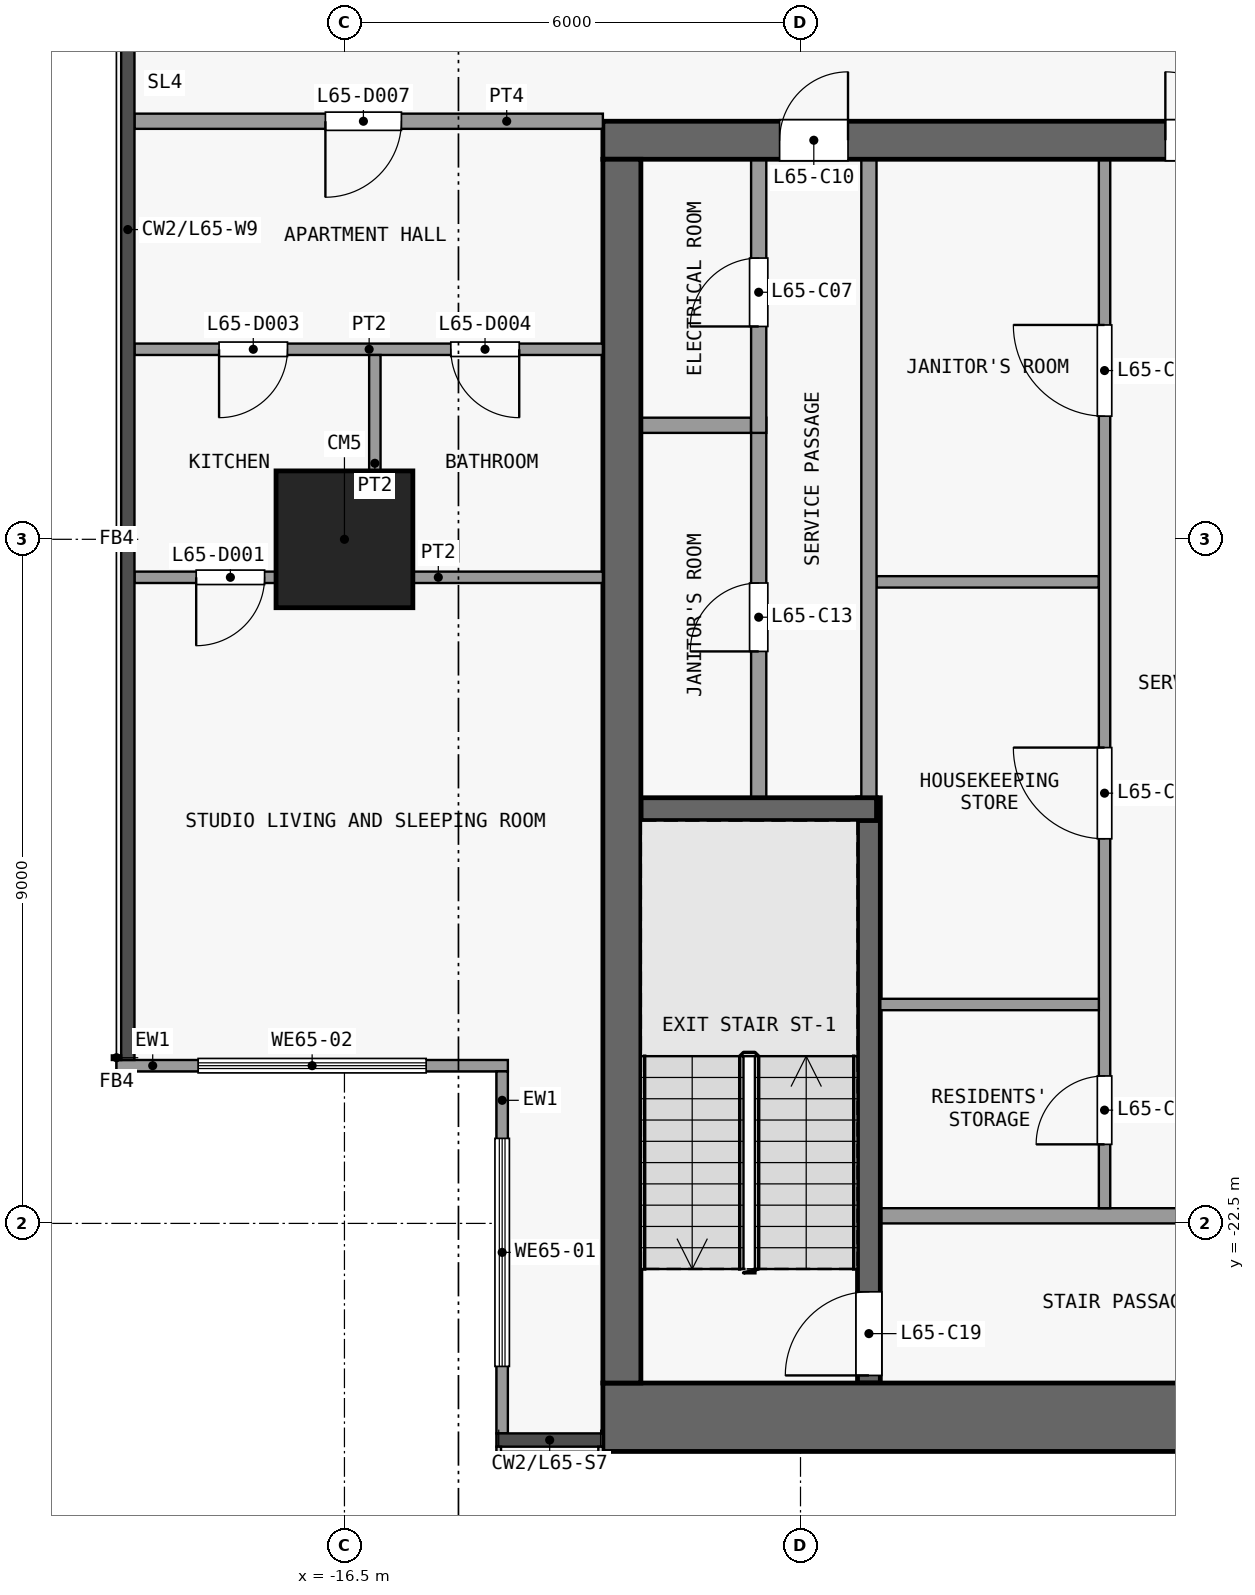
"""IFC4 building model, lengths in metres.
Left out: names, types, materials, properties, quantities, classifications, styles, units other than length and angle.
Written with IfcOpenShell. Run it as: python <this file> out.ifc"""

import sys

from ifc_helpers import new_model, si_unit, direction, frame, frame_2d, origin, origin_2d, place, context, subcontext, project, spatial, rectangle, extrude, element, fill, save


model = new_model("IFC4")
c1 = context("Model", 3, precision=1e-05, world=origin(), true_north=direction((0.0, 1.0)))
c2 = subcontext(c1, "Body", "Model", "MODEL_VIEW")
j1 = project(units=[si_unit("LENGTHUNIT", "METRE"), si_unit("PLANEANGLEUNIT", "RADIAN")], contexts=[c1])
p1 = place(None, origin())
s1 = spatial("IfcSite", under=j1, at=p1, CompositionType="ELEMENT")
p2 = place(p1, origin())
s2 = spatial("IfcBuilding", under=s1, at=p2, CompositionType="ELEMENT")
p3 = place(p2, frame((0.0, 0.0, 259.1)))
s3 = spatial("IfcBuildingStorey", under=s2, at=p3, CompositionType="ELEMENT", Elevation=259.1)
p4 = place(p3, frame((-16.5, -13.5, 0.0), z_axis=(0.0, 0.0, 1.0), x_axis=(1.0, 0.0, 0.0)))
e1 = element("IfcColumn", 1, at=p4, inside=s3, PredefinedType="COLUMN", context=c2, shape_type="SweptSolid", body=[
    extrude(rectangle(XDim=1.8, YDim=1.8, at=origin_2d()), origin(), (0.0, 0.0, 1.0), 3.6),
])
p5 = place(p3, frame((-13.1, -25.05, 0.0), z_axis=(0.0, 0.0, 1.0), x_axis=(1.0, 0.0, 0.0)))
e2 = element("IfcWall", 2, at=p5, inside=s3, PredefinedType="SHEAR", context=c2, shape_type="SweptSolid", body=[
    extrude(rectangle(XDim=26.2, YDim=0.9, at=frame_2d((13.1, 0.0))), origin(), (0.0, 0.0, 1.0), 3.3),
])
p6 = place(p3, frame((-13.1, -8.25, 0.0), z_axis=(0.0, 0.0, 1.0), x_axis=(1.0, 0.0, 0.0)))
e3 = element("IfcWall", 3, at=p6, inside=s3, PredefinedType="SHEAR", context=c2, shape_type="SweptSolid", body=[
    extrude(rectangle(XDim=26.2, YDim=0.5, at=frame_2d((13.1, 0.0))), origin(), (0.0, 0.0, 1.0), 3.3),
])
p7 = place(p6, frame((7.4, 0.0, 0.0)))
e4 = element("IfcOpeningElement", 4, at=p7, cuts=e3, PredefinedType="OPENING", context=c2, shape_type="SweptSolid", body=[
    extrude(rectangle(XDim=1.8, YDim=2.1, at=frame_2d((0.9, 1.05))), frame((0.0, 0.26, 0.0), z_axis=(0.0, -1.0, 0.0), x_axis=(1.0, 0.0, 0.0)), (0.0, 0.0, 1.0), 0.52),
])
p8 = place(p6, frame((17.0, 0.0, 0.0)))
e5 = element("IfcOpeningElement", 5, at=p8, cuts=e3, PredefinedType="OPENING", context=c2, shape_type="SweptSolid", body=[
    extrude(rectangle(XDim=1.8, YDim=2.1, at=frame_2d((0.9, 1.05))), frame((0.0, 0.26, 0.0), z_axis=(0.0, -1.0, 0.0), x_axis=(1.0, 0.0, 0.0)), (0.0, 0.0, 1.0), 0.52),
])
p9 = place(p6, frame((2.325, 0.0, 0.0)))
e6 = element("IfcOpeningElement", 6, at=p9, cuts=e3, PredefinedType="OPENING", context=c2, shape_type="SweptSolid", body=[
    extrude(rectangle(XDim=0.9, YDim=2.1, at=frame_2d((0.45, 1.05))), frame((0.0, 0.26, 0.0), z_axis=(0.0, -1.0, 0.0), x_axis=(1.0, 0.0, 0.0)), (0.0, 0.0, 1.0), 0.52),
])
p10 = place(p6, frame((23.675, 0.0, 0.0)))
e7 = element("IfcOpeningElement", 7, at=p10, cuts=e3, PredefinedType="OPENING", context=c2, shape_type="SweptSolid", body=[
    extrude(rectangle(XDim=1.2, YDim=2.1, at=frame_2d((0.6, 1.05))), frame((0.0, 0.26, 0.0), z_axis=(0.0, -1.0, 0.0), x_axis=(1.0, 0.0, 0.0)), (0.0, 0.0, 1.0), 0.52),
])
p11 = place(p3, frame((-12.85, -24.6, 0.0), z_axis=(0.0, 0.0, 1.0), x_axis=(0.0, 1.0, 0.0)))
e8 = element("IfcWall", 8, at=p11, inside=s3, PredefinedType="SHEAR", context=c2, shape_type="SweptSolid", body=[
    extrude(rectangle(XDim=16.1, YDim=0.5, at=frame_2d((8.05, 0.0))), origin(), (0.0, 0.0, 1.0), 3.3),
])
p12 = place(p3, frame((-3.25, -22.4, 0.0), z_axis=(0.0, 0.0, 1.0), x_axis=(-1.0, 0.0, 0.0)))
e9 = element("IfcWall", 9, at=p12, inside=s3, PredefinedType="PARTITIONING", context=c2, shape_type="SweptSolid", body=[
    extrude(rectangle(XDim=6.2, YDim=0.2, at=frame_2d((3.1, 0.0))), origin(), (0.0, 0.0, 1.0), 3.3),
])
p13 = place(p12, frame((0.8, 0.0, 0.0)))
e10 = element("IfcOpeningElement", 10, at=p13, cuts=e9, PredefinedType="OPENING", context=c2, shape_type="SweptSolid", body=[
    extrude(rectangle(XDim=1.5, YDim=2.1, at=frame_2d((0.75, 1.05))), frame((0.0, 0.11, 0.0), z_axis=(0.0, -1.0, 0.0), x_axis=(1.0, 0.0, 0.0)), (0.0, 0.0, 1.0), 0.22),
])
p14 = place(p3, frame((-9.45, -19.62, 0.0), z_axis=(0.0, 0.0, 1.0), x_axis=(1.0, 0.0, 0.0)))
e11 = element("IfcWall", 11, at=p14, inside=s3, PredefinedType="PARTITIONING", context=c2, shape_type="SweptSolid", body=[
    extrude(rectangle(XDim=2.875, YDim=0.15, at=frame_2d((1.438, 0.0))), origin(), (0.0, 0.0, 1.0), 3.3),
])
p15 = place(p3, frame((-12.6, -17.05, 0.0), z_axis=(0.0, 0.0, 1.0), x_axis=(1.0, 0.0, 0.0)))
e12 = element("IfcWall", 12, at=p15, inside=s3, PredefinedType="SHEAR", context=c2, shape_type="SweptSolid", body=[
    extrude(rectangle(XDim=3.1, YDim=0.3, at=frame_2d((1.55, 0.0))), origin(), (0.0, 0.0, 1.0), 3.3),
])
p16 = place(p3, frame((-9.5, -14.06, 0.0), z_axis=(0.0, 0.0, 1.0), x_axis=(1.0, 0.0, 0.0)))
e13 = element("IfcWall", 13, at=p16, inside=s3, PredefinedType="PARTITIONING", context=c2, shape_type="SweptSolid", body=[
    extrude(rectangle(XDim=2.925, YDim=0.15, at=frame_2d((1.462, 0.0))), origin(), (0.0, 0.0, 1.0), 3.3),
])
p17 = place(p3, frame((-12.6, -12.0, 0.0), z_axis=(0.0, 0.0, 1.0), x_axis=(1.0, 0.0, 0.0)))
e14 = element("IfcWall", 14, at=p17, inside=s3, PredefinedType="PARTITIONING", context=c2, shape_type="SweptSolid", body=[
    extrude(rectangle(XDim=1.45, YDim=0.2, at=frame_2d((0.725, 0.0))), origin(), (0.0, 0.0, 1.0), 3.3),
])
p18 = place(p3, frame((-11.05, -16.9, 0.0), z_axis=(0.0, 0.0, 1.0), x_axis=(0.0, 1.0, 0.0)))
e15 = element("IfcWall", 15, at=p18, inside=s3, PredefinedType="PARTITIONING", context=c2, shape_type="SweptSolid", body=[
    extrude(rectangle(XDim=5.0, YDim=0.2, at=frame_2d((2.5, 0.0))), origin(), (0.0, 0.0, 1.0), 3.3),
])
p19 = place(p18, frame((1.925, 0.0, 0.0)))
e16 = element("IfcOpeningElement", 16, at=p19, cuts=e15, PredefinedType="OPENING", context=c2, shape_type="SweptSolid", body=[
    extrude(rectangle(XDim=0.9, YDim=2.1, at=frame_2d((0.45, 1.05))), frame((0.0, 0.11, 0.0), z_axis=(0.0, -1.0, 0.0), x_axis=(1.0, 0.0, 0.0)), (0.0, 0.0, 1.0), 0.22),
])
p20 = place(p3, frame((-11.05, -12.1, 0.0), z_axis=(0.0, 0.0, 1.0), x_axis=(0.0, 1.0, 0.0)))
e17 = element("IfcWall", 17, at=p20, inside=s3, PredefinedType="PARTITIONING", context=c2, shape_type="SweptSolid", body=[
    extrude(rectangle(XDim=3.6, YDim=0.2, at=frame_2d((1.8, 0.0))), origin(), (0.0, 0.0, 1.0), 3.3),
])
p21 = place(p20, frame((1.4, 0.0, 0.0)))
e18 = element("IfcOpeningElement", 18, at=p21, cuts=e17, PredefinedType="OPENING", context=c2, shape_type="SweptSolid", body=[
    extrude(rectangle(XDim=0.9, YDim=2.1, at=frame_2d((0.45, 1.05))), frame((0.0, 0.11, 0.0), z_axis=(0.0, -1.0, 0.0), x_axis=(1.0, 0.0, 0.0)), (0.0, 0.0, 1.0), 0.22),
])
p22 = place(p3, frame((-9.6, -24.6, 0.0), z_axis=(0.0, 0.0, 1.0), x_axis=(0.0, 1.0, 0.0)))
e19 = element("IfcWall", 19, at=p22, inside=s3, PredefinedType="SHEAR", context=c2, shape_type="SweptSolid", body=[
    extrude(rectangle(XDim=7.7, YDim=0.3, at=frame_2d((3.85, 0.0))), origin(), (0.0, 0.0, 1.0), 3.3),
])
p23 = place(p22, frame((0.1, 0.0, 0.0)))
e20 = element("IfcOpeningElement", 20, at=p23, cuts=e19, PredefinedType="OPENING", context=c2, shape_type="SweptSolid", body=[
    extrude(rectangle(XDim=1.1, YDim=2.1, at=frame_2d((0.55, 1.05))), frame((0.0, 0.16, 0.0), z_axis=(0.0, -1.0, 0.0), x_axis=(1.0, 0.0, 0.0)), (0.0, 0.0, 1.0), 0.32),
])
p24 = place(p3, frame((-9.6, -16.9, 0.0), z_axis=(0.0, 0.0, 1.0), x_axis=(0.0, 1.0, 0.0)))
e21 = element("IfcWall", 21, at=p24, inside=s3, PredefinedType="PARTITIONING", context=c2, shape_type="SweptSolid", body=[
    extrude(rectangle(XDim=8.4, YDim=0.2, at=frame_2d((4.2, 0.0))), origin(), (0.0, 0.0, 1.0), 3.3),
])
p25 = place(p3, frame((-6.5, -22.3, 0.0), z_axis=(0.0, 0.0, 1.0), x_axis=(0.0, 1.0, 0.0)))
e22 = element("IfcWall", 22, at=p25, inside=s3, PredefinedType="PARTITIONING", context=c2, shape_type="SweptSolid", body=[
    extrude(rectangle(XDim=13.8, YDim=0.15, at=frame_2d((6.9, 0.0))), origin(), (0.0, 0.0, 1.0), 3.3),
])
p26 = place(p25, frame((0.84, 0.0, 0.0)))
e23 = element("IfcOpeningElement", 23, at=p26, cuts=e22, PredefinedType="OPENING", context=c2, shape_type="SweptSolid", body=[
    extrude(rectangle(XDim=0.9, YDim=2.1, at=frame_2d((0.45, 1.05))), frame((0.0, 0.085, 0.0), z_axis=(0.0, -1.0, 0.0), x_axis=(1.0, 0.0, 0.0)), (0.0, 0.0, 1.0), 0.17),
])
p27 = place(p25, frame((4.86, 0.0, 0.0)))
e24 = element("IfcOpeningElement", 24, at=p27, cuts=e22, PredefinedType="OPENING", context=c2, shape_type="SweptSolid", body=[
    extrude(rectangle(XDim=1.2, YDim=2.1, at=frame_2d((0.6, 1.05))), frame((0.0, 0.085, 0.0), z_axis=(0.0, -1.0, 0.0), x_axis=(1.0, 0.0, 0.0)), (0.0, 0.0, 1.0), 0.17),
])
p28 = place(p25, frame((10.42, 0.0, 0.0)))
e25 = element("IfcOpeningElement", 25, at=p28, cuts=e22, PredefinedType="OPENING", context=c2, shape_type="SweptSolid", body=[
    extrude(rectangle(XDim=1.2, YDim=2.1, at=frame_2d((0.6, 1.05))), frame((0.0, 0.085, 0.0), z_axis=(0.0, -1.0, 0.0), x_axis=(1.0, 0.0, 0.0)), (0.0, 0.0, 1.0), 0.17),
])
p29 = place(p3, frame((-14.425, -25.262, 0.0), z_axis=(0.0, 0.0, 1.0), x_axis=(0.0, 1.0, 0.0)))
e26 = element("IfcWall", 26, at=p29, inside=s3, PredefinedType="SOLIDWALL", context=c2, shape_type="SweptSolid", body=[
    extrude(rectangle(XDim=4.762, YDim=0.15, at=frame_2d((2.381, 0.0))), origin(), (0.0, 0.0, 1.0), 3.3),
])
p30 = place(p29, frame((0.881, 0.0, 0.9)))
e27 = element("IfcOpeningElement", 27, at=p30, cuts=e26, PredefinedType="OPENING", context=c2, shape_type="SweptSolid", body=[
    extrude(rectangle(XDim=3.0, YDim=2.4, at=frame_2d((1.5, 1.2))), frame((0.0, 0.085, 0.0), z_axis=(0.0, -1.0, 0.0), x_axis=(1.0, 0.0, 0.0)), (0.0, 0.0, 1.0), 0.17),
])
p31 = place(p3, frame((-14.35, -20.425, 0.0), z_axis=(0.0, 0.0, 1.0), x_axis=(-1.0, 0.0, 0.0)))
e28 = element("IfcWall", 28, at=p31, inside=s3, PredefinedType="SOLIDWALL", context=c2, shape_type="SweptSolid", body=[
    extrude(rectangle(XDim=5.15, YDim=0.15, at=frame_2d((2.575, 0.0))), origin(), (0.0, 0.0, 1.0), 3.3),
])
p32 = place(p31, frame((1.075, 0.0, 0.9)))
e29 = element("IfcOpeningElement", 29, at=p32, cuts=e28, PredefinedType="OPENING", context=c2, shape_type="SweptSolid", body=[
    extrude(rectangle(XDim=3.0, YDim=2.4, at=frame_2d((1.5, 1.2))), frame((0.0, 0.085, 0.0), z_axis=(0.0, -1.0, 0.0), x_axis=(1.0, 0.0, 0.0)), (0.0, 0.0, 1.0), 0.17),
])
p33 = place(p3, frame((-19.262, -14.0, 0.0), z_axis=(0.0, 0.0, 1.0), x_axis=(1.0, 0.0, 0.0)))
e30 = element("IfcWall", 30, at=p33, inside=s3, PredefinedType="PARTITIONING", context=c2, shape_type="SweptSolid", body=[
    extrude(rectangle(XDim=6.162, YDim=0.15, at=frame_2d((3.081, 0.0))), origin(), (0.0, 0.0, 1.0), 3.3),
])
p34 = place(p33, frame((0.812, 0.0, 0.0)))
e31 = element("IfcOpeningElement", 31, at=p34, cuts=e30, PredefinedType="OPENING", context=c2, shape_type="SweptSolid", body=[
    extrude(rectangle(XDim=0.9, YDim=2.1, at=frame_2d((0.45, 1.05))), frame((0.0, 0.085, 0.0), z_axis=(0.0, -1.0, 0.0), x_axis=(1.0, 0.0, 0.0)), (0.0, 0.0, 1.0), 0.17),
])
p35 = place(p3, frame((-19.262, -11.0, 0.0), z_axis=(0.0, 0.0, 1.0), x_axis=(1.0, 0.0, 0.0)))
e32 = element("IfcWall", 32, at=p35, inside=s3, PredefinedType="PARTITIONING", context=c2, shape_type="SweptSolid", body=[
    extrude(rectangle(XDim=6.162, YDim=0.15, at=frame_2d((3.081, 0.0))), origin(), (0.0, 0.0, 1.0), 3.3),
])
p36 = place(p35, frame((1.113, 0.0, 0.0)))
e33 = element("IfcOpeningElement", 33, at=p36, cuts=e32, PredefinedType="OPENING", context=c2, shape_type="SweptSolid", body=[
    extrude(rectangle(XDim=0.9, YDim=2.1, at=frame_2d((0.45, 1.05))), frame((0.0, 0.085, 0.0), z_axis=(0.0, -1.0, 0.0), x_axis=(1.0, 0.0, 0.0)), (0.0, 0.0, 1.0), 0.17),
])
p37 = place(p35, frame((4.162, 0.0, 0.0)))
e34 = element("IfcOpeningElement", 34, at=p37, cuts=e32, PredefinedType="OPENING", context=c2, shape_type="SweptSolid", body=[
    extrude(rectangle(XDim=0.9, YDim=2.1, at=frame_2d((0.45, 1.05))), frame((0.0, 0.085, 0.0), z_axis=(0.0, -1.0, 0.0), x_axis=(1.0, 0.0, 0.0)), (0.0, 0.0, 1.0), 0.17),
])
p38 = place(p3, frame((-19.262, -8.0, 0.0), z_axis=(0.0, 0.0, 1.0), x_axis=(1.0, 0.0, 0.0)))
e35 = element("IfcWall", 35, at=p38, inside=s3, PredefinedType="PARTITIONING", context=c2, shape_type="SweptSolid", body=[
    extrude(rectangle(XDim=6.162, YDim=0.2, at=frame_2d((3.081, 0.0))), origin(), (0.0, 0.0, 1.0), 3.3),
])
p39 = place(p38, frame((2.512, 0.0, 0.0)))
e36 = element("IfcOpeningElement", 36, at=p39, cuts=e35, PredefinedType="OPENING", context=c2, shape_type="SweptSolid", body=[
    extrude(rectangle(XDim=1.0, YDim=2.1, at=frame_2d((0.5, 1.05))), frame((0.0, 0.11, 0.0), z_axis=(0.0, -1.0, 0.0), x_axis=(1.0, 0.0, 0.0)), (0.0, 0.0, 1.0), 0.22),
])
p40 = place(p3, frame((-16.1, -13.925, 0.0), z_axis=(0.0, 0.0, 1.0), x_axis=(0.0, 1.0, 0.0)))
e37 = element("IfcWall", 37, at=p40, inside=s3, PredefinedType="PARTITIONING", context=c2, shape_type="SweptSolid", body=[
    extrude(rectangle(XDim=2.85, YDim=0.15, at=frame_2d((1.425, 0.0))), origin(), (0.0, 0.0, 1.0), 3.3),
])
p41 = place(p7, origin())
e38 = element("IfcDoor", 38, at=p41, inside=s3, OperationType="DOUBLE_DOOR_SINGLE_SWING", PredefinedType="DOOR", context=c2, shape_type="SweptSolid", body=[
    extrude(rectangle(XDim=1.8, YDim=2.1, at=frame_2d((0.9, 1.05))), frame((0.0, 0.025, 0.0), z_axis=(0.0, -1.0, 0.0), x_axis=(1.0, 0.0, 0.0)), (0.0, 0.0, 1.0), 0.05),
])
fill(e4, e38)
p42 = place(p21, origin())
e39 = element("IfcDoor", 39, at=p42, inside=s3, OperationType="SINGLE_SWING_LEFT", PredefinedType="DOOR", context=c2, shape_type="SweptSolid", body=[
    extrude(rectangle(XDim=0.9, YDim=2.1, at=frame_2d((0.45, 1.05))), frame((0.0, 0.025, 0.0), z_axis=(0.0, -1.0, 0.0), x_axis=(1.0, 0.0, 0.0)), (0.0, 0.0, 1.0), 0.05),
])
fill(e18, e39)
p43 = place(p9, origin())
e40 = element("IfcDoor", 40, at=p43, inside=s3, OperationType="SINGLE_SWING_RIGHT", PredefinedType="DOOR", context=c2, shape_type="SweptSolid", body=[
    extrude(rectangle(XDim=0.9, YDim=2.1, at=frame_2d((0.45, 1.05))), frame((0.0, 0.025, 0.0), z_axis=(0.0, -1.0, 0.0), x_axis=(1.0, 0.0, 0.0)), (0.0, 0.0, 1.0), 0.05),
])
fill(e6, e40)
p44 = place(p19, origin())
e41 = element("IfcDoor", 41, at=p44, inside=s3, OperationType="SINGLE_SWING_LEFT", PredefinedType="DOOR", context=c2, shape_type="SweptSolid", body=[
    extrude(rectangle(XDim=0.9, YDim=2.1, at=frame_2d((0.45, 1.05))), frame((0.0, 0.025, 0.0), z_axis=(0.0, -1.0, 0.0), x_axis=(1.0, 0.0, 0.0)), (0.0, 0.0, 1.0), 0.05),
])
fill(e16, e41)
p45 = place(p26, origin())
e42 = element("IfcDoor", 42, at=p45, inside=s3, OperationType="SINGLE_SWING_LEFT", PredefinedType="DOOR", context=c2, shape_type="SweptSolid", body=[
    extrude(rectangle(XDim=0.9, YDim=2.1, at=frame_2d((0.45, 1.05))), frame((0.0, 0.025, 0.0), z_axis=(0.0, -1.0, 0.0), x_axis=(1.0, 0.0, 0.0)), (0.0, 0.0, 1.0), 0.05),
])
fill(e23, e42)
p46 = place(p27, origin())
e43 = element("IfcDoor", 43, at=p46, inside=s3, OperationType="SINGLE_SWING_RIGHT", PredefinedType="DOOR", context=c2, shape_type="SweptSolid", body=[
    extrude(rectangle(XDim=1.2, YDim=2.1, at=frame_2d((0.6, 1.05))), frame((0.0, 0.025, 0.0), z_axis=(0.0, -1.0, 0.0), x_axis=(1.0, 0.0, 0.0)), (0.0, 0.0, 1.0), 0.05),
])
fill(e24, e43)
p47 = place(p28, origin())
e44 = element("IfcDoor", 44, at=p47, inside=s3, OperationType="SINGLE_SWING_RIGHT", PredefinedType="DOOR", context=c2, shape_type="SweptSolid", body=[
    extrude(rectangle(XDim=1.2, YDim=2.1, at=frame_2d((0.6, 1.05))), frame((0.0, 0.025, 0.0), z_axis=(0.0, -1.0, 0.0), x_axis=(1.0, 0.0, 0.0)), (0.0, 0.0, 1.0), 0.05),
])
fill(e25, e44)
p48 = place(p23, origin())
e45 = element("IfcDoor", 45, at=p48, inside=s3, OperationType="SINGLE_SWING_LEFT", PredefinedType="DOOR", context=c2, shape_type="SweptSolid", body=[
    extrude(rectangle(XDim=1.1, YDim=2.1, at=frame_2d((0.55, 1.05))), frame((0.0, 0.025, 0.0), z_axis=(0.0, -1.0, 0.0), x_axis=(1.0, 0.0, 0.0)), (0.0, 0.0, 1.0), 0.05),
])
fill(e20, e45)
p49 = place(p30, origin())
e46 = element("IfcWindow", 46, at=p49, inside=s3, PartitioningType="SINGLE_PANEL", PredefinedType="WINDOW", context=c2, shape_type="SweptSolid", body=[
    extrude(rectangle(XDim=3.0, YDim=2.4, at=frame_2d((1.5, 1.2))), frame((0.0, 0.03, 0.0), z_axis=(0.0, -1.0, 0.0), x_axis=(1.0, 0.0, 0.0)), (0.0, 0.0, 1.0), 0.06),
])
fill(e27, e46)
p50 = place(p32, origin())
e47 = element("IfcWindow", 47, at=p50, inside=s3, PartitioningType="SINGLE_PANEL", PredefinedType="WINDOW", context=c2, shape_type="SweptSolid", body=[
    extrude(rectangle(XDim=3.0, YDim=2.4, at=frame_2d((1.5, 1.2))), frame((0.0, 0.03, 0.0), z_axis=(0.0, -1.0, 0.0), x_axis=(1.0, 0.0, 0.0)), (0.0, 0.0, 1.0), 0.06),
])
fill(e29, e47)
p51 = place(p34, origin())
e48 = element("IfcDoor", 48, at=p51, inside=s3, OperationType="SINGLE_SWING_LEFT", PredefinedType="DOOR", context=c2, shape_type="SweptSolid", body=[
    extrude(rectangle(XDim=0.9, YDim=2.1, at=frame_2d((0.45, 1.05))), frame((0.0, 0.025, 0.0), z_axis=(0.0, -1.0, 0.0), x_axis=(1.0, 0.0, 0.0)), (0.0, 0.0, 1.0), 0.05),
])
fill(e31, e48)
p52 = place(p36, origin())
e49 = element("IfcDoor", 49, at=p52, inside=s3, OperationType="SINGLE_SWING_LEFT", PredefinedType="DOOR", context=c2, shape_type="SweptSolid", body=[
    extrude(rectangle(XDim=0.9, YDim=2.1, at=frame_2d((0.45, 1.05))), frame((0.0, 0.025, 0.0), z_axis=(0.0, -1.0, 0.0), x_axis=(1.0, 0.0, 0.0)), (0.0, 0.0, 1.0), 0.05),
])
fill(e33, e49)
p53 = place(p37, origin())
e50 = element("IfcDoor", 50, at=p53, inside=s3, OperationType="SINGLE_SWING_RIGHT", PredefinedType="DOOR", context=c2, shape_type="SweptSolid", body=[
    extrude(rectangle(XDim=0.9, YDim=2.1, at=frame_2d((0.45, 1.05))), frame((0.0, 0.025, 0.0), z_axis=(0.0, -1.0, 0.0), x_axis=(1.0, 0.0, 0.0)), (0.0, 0.0, 1.0), 0.05),
])
fill(e34, e50)
p54 = place(p39, origin())
e51 = element("IfcDoor", 51, at=p54, inside=s3, OperationType="SINGLE_SWING_LEFT", PredefinedType="DOOR", context=c2, shape_type="SweptSolid", body=[
    extrude(rectangle(XDim=1.0, YDim=2.1, at=frame_2d((0.5, 1.05))), frame((0.0, 0.025, 0.0), z_axis=(0.0, -1.0, 0.0), x_axis=(1.0, 0.0, 0.0)), (0.0, 0.0, 1.0), 0.05),
])
fill(e36, e51)
save(model, sys.argv[1])
